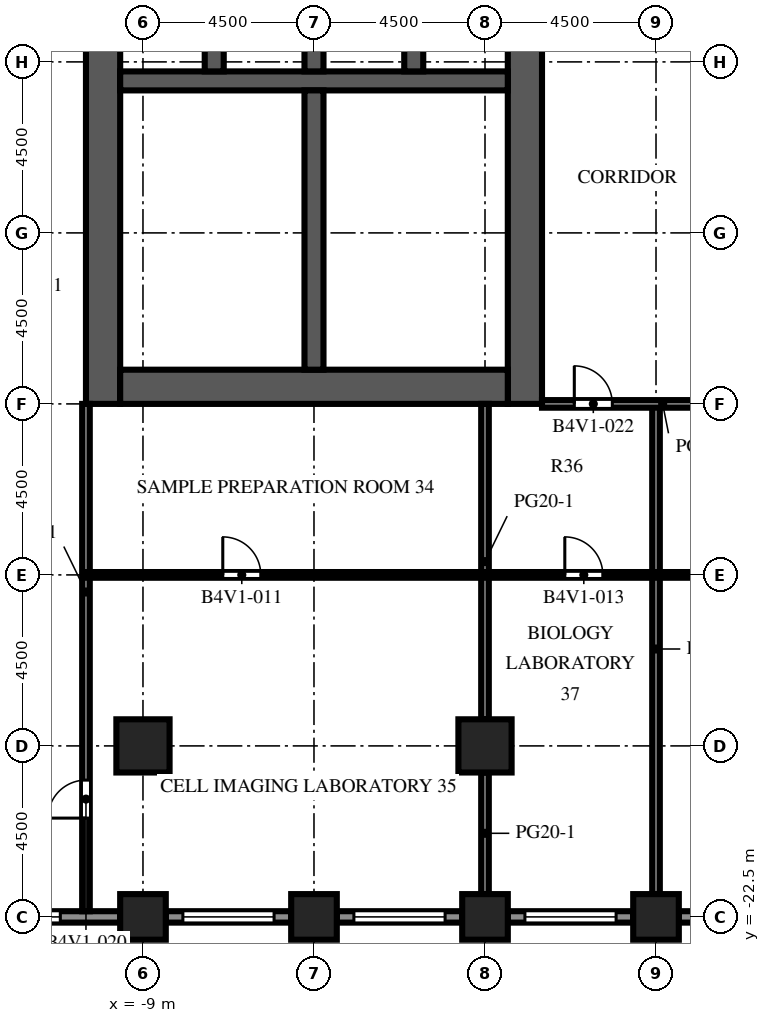
"""IFC4 building model, lengths in metres.
Left out: names, types, materials, properties, quantities, classifications, styles, units other than length and angle.
Written with IfcOpenShell. Run it as: python <this file> out.ifc"""

import sys

from ifc_helpers import new_model, si_unit, direction, frame, frame_2d, origin, origin_2d, place, context, subcontext, project, spatial, rectangle, extrude, element, fill, save


model = new_model("IFC4")
c1 = context("Model", 3, precision=1e-05, world=origin(), true_north=direction((0.0, 1.0)))
c2 = subcontext(c1, "Body", "Model", "MODEL_VIEW")
j1 = project(units=[si_unit("LENGTHUNIT", "METRE"), si_unit("PLANEANGLEUNIT", "RADIAN")], contexts=[c1])
p1 = place(None, origin())
s1 = spatial("IfcSite", under=j1, at=p1, CompositionType="ELEMENT")
p2 = place(p1, origin())
s2 = spatial("IfcBuilding", under=s1, at=p2, CompositionType="ELEMENT")
p3 = place(p2, frame((0.0, 0.0, 133.1)))
s3 = spatial("IfcBuildingStorey", under=s2, at=p3, CompositionType="ELEMENT", Elevation=133.1)
for number, where, z_axis, x_axis in (
    (1, (-9.0, -22.5, 0.0), (0.0, 0.0, 1.0), (1.0, 0.0, 0.0)),
    (2, (-4.5, -22.5, 0.0), (0.0, 0.0, 1.0), (1.0, 0.0, 0.0)),
    (3, (0.0, -22.5, 0.0), (0.0, 0.0, 1.0), (1.0, 0.0, 0.0)),
    (4, (4.5, -22.5, 0.0), (0.0, 0.0, 1.0), (1.0, 0.0, 0.0)),
):
    element("IfcColumn", number, at=place(p3, frame(where, z_axis=z_axis, x_axis=x_axis)), inside=s3, PredefinedType="COLUMN", context=c2, shape_type="SweptSolid", body=[
        extrude(rectangle(XDim=1.2, YDim=1.2, at=origin_2d()), origin(), (0.0, 0.0, 1.0), 4.1),
    ])
for number, where, z_axis, x_axis in (
    (5, (-9.0, -18.0, 0.0), (0.0, 0.0, 1.0), (1.0, 0.0, 0.0)),
    (6, (0.0, -18.0, 0.0), (0.0, 0.0, 1.0), (1.0, 0.0, 0.0)),
):
    element("IfcColumn", number, at=place(p3, frame(where, z_axis=z_axis, x_axis=x_axis)), inside=s3, PredefinedType="COLUMN", context=c2, shape_type="SweptSolid", body=[
        extrude(rectangle(XDim=1.4, YDim=1.4, at=origin_2d()), origin(), (0.0, 0.0, 1.0), 4.1),
    ])
p4 = place(p3, frame((-10.05, -9.0, 0.0), z_axis=(0.0, 0.0, 1.0), x_axis=(0.0, 1.0, 0.0)))
e7 = element("IfcWall", 7, at=p4, inside=s3, PredefinedType="SHEAR", context=c2, shape_type="SweptSolid", body=[
    extrude(rectangle(XDim=27.5, YDim=0.9, at=frame_2d((13.75, 0.0))), origin(), (0.0, 0.0, 1.0), 4.1),
])
p5 = place(p4, frame((12.55, 0.0, 0.0)))
e8 = element("IfcOpeningElement", 8, at=p5, cuts=e7, PredefinedType="OPENING", context=c2, shape_type="SweptSolid", body=[
    extrude(rectangle(XDim=2.4, YDim=2.4, at=frame_2d((1.2, 1.2))), frame((0.0, 0.46, 0.0), z_axis=(0.0, -1.0, 0.0), x_axis=(1.0, 0.0, 0.0)), (0.0, 0.0, 1.0), 0.92),
])
p6 = place(p4, frame((6.825, 0.0, 0.0)))
e9 = element("IfcOpeningElement", 9, at=p6, cuts=e7, PredefinedType="OPENING", context=c2, shape_type="SweptSolid", body=[
    extrude(rectangle(XDim=1.2, YDim=2.1, at=frame_2d((0.6, 1.05))), frame((0.0, 0.46, 0.0), z_axis=(0.0, -1.0, 0.0), x_axis=(1.0, 0.0, 0.0)), (0.0, 0.0, 1.0), 0.92),
])
p7 = place(p4, frame((19.475, 0.0, 0.0)))
e10 = element("IfcOpeningElement", 10, at=p7, cuts=e7, PredefinedType="OPENING", context=c2, shape_type="SweptSolid", body=[
    extrude(rectangle(XDim=1.2, YDim=2.1, at=frame_2d((0.6, 1.05))), frame((0.0, 0.46, 0.0), z_axis=(0.0, -1.0, 0.0), x_axis=(1.0, 0.0, 0.0)), (0.0, 0.0, 1.0), 0.92),
])
p8 = place(p3, frame((1.05, -9.0, 0.0), z_axis=(0.0, 0.0, 1.0), x_axis=(0.0, 1.0, 0.0)))
e11 = element("IfcWall", 11, at=p8, inside=s3, PredefinedType="SHEAR", context=c2, shape_type="SweptSolid", body=[
    extrude(rectangle(XDim=27.5, YDim=0.9, at=frame_2d((13.75, 0.0))), origin(), (0.0, 0.0, 1.0), 4.1),
])
p9 = place(p8, frame((12.55, 0.0, 0.0)))
e12 = element("IfcOpeningElement", 12, at=p9, cuts=e11, PredefinedType="OPENING", context=c2, shape_type="SweptSolid", body=[
    extrude(rectangle(XDim=2.4, YDim=2.4, at=frame_2d((1.2, 1.2))), frame((0.0, 0.46, 0.0), z_axis=(0.0, -1.0, 0.0), x_axis=(1.0, 0.0, 0.0)), (0.0, 0.0, 1.0), 0.92),
])
p10 = place(p8, frame((3.975, 0.0, 0.0)))
e13 = element("IfcOpeningElement", 13, at=p10, cuts=e11, PredefinedType="OPENING", context=c2, shape_type="SweptSolid", body=[
    extrude(rectangle(XDim=1.2, YDim=2.1, at=frame_2d((0.6, 1.05))), frame((0.0, 0.46, 0.0), z_axis=(0.0, -1.0, 0.0), x_axis=(1.0, 0.0, 0.0)), (0.0, 0.0, 1.0), 0.92),
])
p11 = place(p8, frame((22.325, 0.0, 0.0)))
e14 = element("IfcOpeningElement", 14, at=p11, cuts=e11, PredefinedType="OPENING", context=c2, shape_type="SweptSolid", body=[
    extrude(rectangle(XDim=1.2, YDim=2.1, at=frame_2d((0.6, 1.05))), frame((0.0, 0.46, 0.0), z_axis=(0.0, -1.0, 0.0), x_axis=(1.0, 0.0, 0.0)), (0.0, 0.0, 1.0), 0.92),
])
p12 = place(p3, frame((-9.6, -8.55, 0.0), z_axis=(0.0, 0.0, 1.0), x_axis=(1.0, 0.0, 0.0)))
e15 = element("IfcWall", 15, at=p12, inside=s3, PredefinedType="SHEAR", context=c2, shape_type="SweptSolid", body=[
    extrude(rectangle(XDim=10.2, YDim=0.9, at=frame_2d((5.1, 0.0))), origin(), (0.0, 0.0, 1.0), 4.1),
])
p13 = place(p3, frame((-9.6, -0.5, 0.0), z_axis=(0.0, 0.0, 1.0), x_axis=(1.0, 0.0, 0.0)))
e16 = element("IfcWall", 16, at=p13, inside=s3, PredefinedType="SHEAR", context=c2, shape_type="SweptSolid", body=[
    extrude(rectangle(XDim=10.2, YDim=0.5, at=frame_2d((5.1, 0.0))), origin(), (0.0, 0.0, 1.0), 4.1),
])
for number, where, z_axis, x_axis in (
    (17, (-7.125, -0.25, 0.0), (0.0, 0.0, 1.0), (0.0, 1.0, 0.0)),
    (18, (-4.5, -0.25, 0.0), (0.0, 0.0, 1.0), (0.0, 1.0, 0.0)),
    (19, (-1.875, -0.25, 0.0), (0.0, 0.0, 1.0), (0.0, 1.0, 0.0)),
):
    element("IfcWall", number, at=place(p3, frame(where, z_axis=z_axis, x_axis=x_axis)), inside=s3, PredefinedType="SHEAR", context=c2, shape_type="SweptSolid", body=[
        extrude(rectangle(XDim=2.8, YDim=0.5, at=frame_2d((1.4, 0.0))), origin(), (0.0, 0.0, 1.0), 4.1),
    ])
p14 = place(p3, frame((-4.5, -8.1, 0.0), z_axis=(0.0, 0.0, 1.0), x_axis=(0.0, 1.0, 0.0)))
e20 = element("IfcWall", 20, at=p14, inside=s3, PredefinedType="SHEAR", context=c2, shape_type="SweptSolid", body=[
    extrude(rectangle(XDim=7.35, YDim=0.5, at=frame_2d((3.675, 0.0))), origin(), (0.0, 0.0, 1.0), 4.1),
])
p15 = place(p3, frame((-9.6, -22.5, 0.0), z_axis=(0.0, 0.0, 1.0), x_axis=(-1.0, 0.0, 0.0)))
e21 = element("IfcWall", 21, at=p15, inside=s3, PredefinedType="SOLIDWALL", context=c2, shape_type="SweptSolid", body=[
    extrude(rectangle(XDim=3.3, YDim=0.3, at=frame_2d((1.65, 0.0))), origin(), (0.0, 0.0, 1.0), 2.75),
])
p16 = place(p15, frame((1.575, 0.0, 0.8)))
e22 = element("IfcOpeningElement", 22, at=p16, cuts=e21, PredefinedType="OPENING", context=c2, shape_type="SweptSolid", body=[
    extrude(rectangle(XDim=1.2, YDim=1.7, at=frame_2d((0.6, 0.85))), frame((0.0, 0.16, 0.0), z_axis=(0.0, -1.0, 0.0), x_axis=(1.0, 0.0, 0.0)), (0.0, 0.0, 1.0), 0.32),
])
p17 = place(p3, frame((-5.1, -22.5, 0.0), z_axis=(0.0, 0.0, 1.0), x_axis=(-1.0, 0.0, 0.0)))
e23 = element("IfcWall", 23, at=p17, inside=s3, PredefinedType="SOLIDWALL", context=c2, shape_type="SweptSolid", body=[
    extrude(rectangle(XDim=3.3, YDim=0.3, at=frame_2d((1.65, 0.0))), origin(), (0.0, 0.0, 1.0), 2.75),
])
p18 = place(p17, frame((0.45, 0.0, 0.8)))
e24 = element("IfcOpeningElement", 24, at=p18, cuts=e23, PredefinedType="OPENING", context=c2, shape_type="SweptSolid", body=[
    extrude(rectangle(XDim=2.4, YDim=1.7, at=frame_2d((1.2, 0.85))), frame((0.0, 0.16, 0.0), z_axis=(0.0, -1.0, 0.0), x_axis=(1.0, 0.0, 0.0)), (0.0, 0.0, 1.0), 0.32),
])
p19 = place(p3, frame((-0.6, -22.5, 0.0), z_axis=(0.0, 0.0, 1.0), x_axis=(-1.0, 0.0, 0.0)))
e25 = element("IfcWall", 25, at=p19, inside=s3, PredefinedType="SOLIDWALL", context=c2, shape_type="SweptSolid", body=[
    extrude(rectangle(XDim=3.3, YDim=0.3, at=frame_2d((1.65, 0.0))), origin(), (0.0, 0.0, 1.0), 2.75),
])
p20 = place(p19, frame((0.45, 0.0, 0.8)))
e26 = element("IfcOpeningElement", 26, at=p20, cuts=e25, PredefinedType="OPENING", context=c2, shape_type="SweptSolid", body=[
    extrude(rectangle(XDim=2.4, YDim=1.7, at=frame_2d((1.2, 0.85))), frame((0.0, 0.16, 0.0), z_axis=(0.0, -1.0, 0.0), x_axis=(1.0, 0.0, 0.0)), (0.0, 0.0, 1.0), 0.32),
])
p21 = place(p3, frame((3.9, -22.5, 0.0), z_axis=(0.0, 0.0, 1.0), x_axis=(-1.0, 0.0, 0.0)))
e27 = element("IfcWall", 27, at=p21, inside=s3, PredefinedType="SOLIDWALL", context=c2, shape_type="SweptSolid", body=[
    extrude(rectangle(XDim=3.3, YDim=0.3, at=frame_2d((1.65, 0.0))), origin(), (0.0, 0.0, 1.0), 2.75),
])
p22 = place(p21, frame((0.45, 0.0, 0.8)))
e28 = element("IfcOpeningElement", 28, at=p22, cuts=e27, PredefinedType="OPENING", context=c2, shape_type="SweptSolid", body=[
    extrude(rectangle(XDim=2.4, YDim=1.7, at=frame_2d((1.2, 0.85))), frame((0.0, 0.16, 0.0), z_axis=(0.0, -1.0, 0.0), x_axis=(1.0, 0.0, 0.0)), (0.0, 0.0, 1.0), 0.32),
])
p23 = place(p3, frame((8.4, -22.5, 0.0), z_axis=(0.0, 0.0, 1.0), x_axis=(-1.0, 0.0, 0.0)))
e29 = element("IfcWall", 29, at=p23, inside=s3, PredefinedType="SOLIDWALL", context=c2, shape_type="SweptSolid", body=[
    extrude(rectangle(XDim=3.3, YDim=0.3, at=frame_2d((1.65, 0.0))), origin(), (0.0, 0.0, 1.0), 2.75),
])
p24 = place(p23, frame((0.45, 0.0, 0.8)))
e30 = element("IfcOpeningElement", 30, at=p24, cuts=e29, PredefinedType="OPENING", context=c2, shape_type="SweptSolid", body=[
    extrude(rectangle(XDim=2.4, YDim=1.7, at=frame_2d((1.2, 0.85))), frame((0.0, 0.16, 0.0), z_axis=(0.0, -1.0, 0.0), x_axis=(1.0, 0.0, 0.0)), (0.0, 0.0, 1.0), 0.32),
])
p25 = place(p3, frame((-0.9, -8.1, 0.0), z_axis=(0.0, 0.0, 1.0), x_axis=(0.0, 1.0, 0.0)))
e31 = element("IfcWall", 31, at=p25, inside=s3, PredefinedType="PARTITIONING", context=c2, shape_type="SweptSolid", body=[
    extrude(rectangle(XDim=2.205, YDim=0.1, at=frame_2d((1.103, 0.0))), origin(), (0.0, 0.0, 1.0), 3.65),
])
p26 = place(p25, frame((0.603, 0.0, 0.0)))
e32 = element("IfcOpeningElement", 32, at=p26, cuts=e31, PredefinedType="OPENING", context=c2, shape_type="SweptSolid", body=[
    extrude(rectangle(XDim=1.0, YDim=2.1, at=frame_2d((0.5, 1.05))), frame((0.0, 0.06, 0.0), z_axis=(0.0, -1.0, 0.0), x_axis=(1.0, 0.0, 0.0)), (0.0, 0.0, 1.0), 0.12),
])
p27 = place(p3, frame((-0.9, -5.895, 0.0), z_axis=(0.0, 0.0, 1.0), x_axis=(0.0, 1.0, 0.0)))
e33 = element("IfcWall", 33, at=p27, inside=s3, PredefinedType="PARTITIONING", context=c2, shape_type="SweptSolid", body=[
    extrude(rectangle(XDim=2.205, YDim=0.1, at=frame_2d((1.103, 0.0))), origin(), (0.0, 0.0, 1.0), 3.65),
])
p28 = place(p27, frame((0.603, 0.0, 0.0)))
e34 = element("IfcOpeningElement", 34, at=p28, cuts=e33, PredefinedType="OPENING", context=c2, shape_type="SweptSolid", body=[
    extrude(rectangle(XDim=1.0, YDim=2.1, at=frame_2d((0.5, 1.05))), frame((0.0, 0.06, 0.0), z_axis=(0.0, -1.0, 0.0), x_axis=(1.0, 0.0, 0.0)), (0.0, 0.0, 1.0), 0.12),
])
p29 = place(p3, frame((-0.9, -3.69, 0.0), z_axis=(0.0, 0.0, 1.0), x_axis=(0.0, 1.0, 0.0)))
e35 = element("IfcWall", 35, at=p29, inside=s3, PredefinedType="PARTITIONING", context=c2, shape_type="SweptSolid", body=[
    extrude(rectangle(XDim=1.617, YDim=0.1, at=frame_2d((0.809, 0.0))), origin(), (0.0, 0.0, 1.0), 3.65),
])
p30 = place(p29, frame((0.309, 0.0, 0.0)))
e36 = element("IfcOpeningElement", 36, at=p30, cuts=e35, PredefinedType="OPENING", context=c2, shape_type="SweptSolid", body=[
    extrude(rectangle(XDim=1.0, YDim=2.1, at=frame_2d((0.5, 1.05))), frame((0.0, 0.06, 0.0), z_axis=(0.0, -1.0, 0.0), x_axis=(1.0, 0.0, 0.0)), (0.0, 0.0, 1.0), 0.12),
])
p31 = place(p3, frame((-0.9, -2.073, 0.0), z_axis=(0.0, 0.0, 1.0), x_axis=(0.0, 1.0, 0.0)))
e37 = element("IfcWall", 37, at=p31, inside=s3, PredefinedType="PARTITIONING", context=c2, shape_type="SweptSolid", body=[
    extrude(rectangle(XDim=1.323, YDim=0.1, at=frame_2d((0.662, 0.0))), origin(), (0.0, 0.0, 1.0), 3.65),
])
p32 = place(p31, frame((0.2, 0.0, 0.0)))
e38 = element("IfcOpeningElement", 38, at=p32, cuts=e37, PredefinedType="OPENING", context=c2, shape_type="SweptSolid", body=[
    extrude(rectangle(XDim=0.923, YDim=2.1, at=frame_2d((0.461, 1.05))), frame((0.0, 0.06, 0.0), z_axis=(0.0, -1.0, 0.0), x_axis=(1.0, 0.0, 0.0)), (0.0, 0.0, 1.0), 0.12),
])
for number, where, z_axis, x_axis in (
    (39, (-4.25, -5.895, 0.0), (0.0, 0.0, 1.0), (1.0, 0.0, 0.0)),
    (40, (-4.25, -3.69, 0.0), (0.0, 0.0, 1.0), (1.0, 0.0, 0.0)),
    (41, (-4.25, -2.073, 0.0), (0.0, 0.0, 1.0), (1.0, 0.0, 0.0)),
):
    element("IfcWall", number, at=place(p3, frame(where, z_axis=z_axis, x_axis=x_axis)), inside=s3, PredefinedType="PARTITIONING", context=c2, shape_type="SweptSolid", body=[
        extrude(rectangle(XDim=3.35, YDim=0.1, at=frame_2d((1.675, 0.0))), origin(), (0.0, 0.0, 1.0), 3.65),
    ])
p33 = place(p3, frame((-10.5, -9.0, 0.0), z_axis=(0.0, 0.0, 1.0), x_axis=(0.0, -1.0, 0.0)))
e42 = element("IfcWall", 42, at=p33, inside=s3, PredefinedType="PARTITIONING", context=c2, shape_type="SweptSolid", body=[
    extrude(rectangle(XDim=13.35, YDim=0.2, at=frame_2d((6.675, 0.0))), origin(), (0.0, 0.0, 1.0), 3.65),
])
p34 = place(p33, frame((9.9, 0.0, 0.0)))
e43 = element("IfcOpeningElement", 43, at=p34, cuts=e42, PredefinedType="OPENING", context=c2, shape_type="SweptSolid", body=[
    extrude(rectangle(XDim=1.0, YDim=2.1, at=frame_2d((0.5, 1.05))), frame((0.0, 0.11, 0.0), z_axis=(0.0, -1.0, 0.0), x_axis=(1.0, 0.0, 0.0)), (0.0, 0.0, 1.0), 0.22),
])
p35 = place(p3, frame((0.0, -21.9, 0.0), z_axis=(0.0, 0.0, 1.0), x_axis=(0.0, 1.0, 0.0)))
e44 = element("IfcWall", 44, at=p35, inside=s3, PredefinedType="PARTITIONING", context=c2, shape_type="SweptSolid", body=[
    extrude(rectangle(XDim=3.2, YDim=0.2, at=frame_2d((1.6, 0.0))), origin(), (0.0, 0.0, 1.0), 3.65),
])
p36 = place(p3, frame((0.0, -17.3, 0.0), z_axis=(0.0, 0.0, 1.0), x_axis=(0.0, 1.0, 0.0)))
e45 = element("IfcWall", 45, at=p36, inside=s3, PredefinedType="PARTITIONING", context=c2, shape_type="SweptSolid", body=[
    extrude(rectangle(XDim=8.3, YDim=0.2, at=frame_2d((4.15, 0.0))), origin(), (0.0, 0.0, 1.0), 3.65),
])
p37 = place(p3, frame((4.5, -21.9, 0.0), z_axis=(0.0, 0.0, 1.0), x_axis=(0.0, 1.0, 0.0)))
e46 = element("IfcWall", 46, at=p37, inside=s3, PredefinedType="PARTITIONING", context=c2, shape_type="SweptSolid", body=[
    extrude(rectangle(XDim=12.9, YDim=0.2, at=frame_2d((6.45, 0.0))), origin(), (0.0, 0.0, 1.0), 3.65),
])
p38 = place(p3, frame((-10.5, -13.5, 0.0), z_axis=(0.0, 0.0, 1.0), x_axis=(1.0, 0.0, 0.0)))
e47 = element("IfcWall", 47, at=p38, inside=s3, PredefinedType="PARTITIONING", context=c2, shape_type="SweptSolid", body=[
    extrude(rectangle(XDim=28.5, YDim=0.15, at=frame_2d((14.25, 0.0))), origin(), (0.0, 0.0, 1.0), 3.65),
])
p39 = place(p38, frame((3.6, 0.0, 0.0)))
e48 = element("IfcOpeningElement", 48, at=p39, cuts=e47, PredefinedType="OPENING", context=c2, shape_type="SweptSolid", body=[
    extrude(rectangle(XDim=1.0, YDim=2.1, at=frame_2d((0.5, 1.05))), frame((0.0, 0.085, 0.0), z_axis=(0.0, -1.0, 0.0), x_axis=(1.0, 0.0, 0.0)), (0.0, 0.0, 1.0), 0.17),
])
p40 = place(p38, frame((12.6, 0.0, 0.0)))
e49 = element("IfcOpeningElement", 49, at=p40, cuts=e47, PredefinedType="OPENING", context=c2, shape_type="SweptSolid", body=[
    extrude(rectangle(XDim=1.0, YDim=2.1, at=frame_2d((0.5, 1.05))), frame((0.0, 0.085, 0.0), z_axis=(0.0, -1.0, 0.0), x_axis=(1.0, 0.0, 0.0)), (0.0, 0.0, 1.0), 0.17),
])
p41 = place(p38, frame((19.35, 0.0, 0.0)))
e50 = element("IfcOpeningElement", 50, at=p41, cuts=e47, PredefinedType="OPENING", context=c2, shape_type="SweptSolid", body=[
    extrude(rectangle(XDim=1.0, YDim=2.1, at=frame_2d((0.5, 1.05))), frame((0.0, 0.085, 0.0), z_axis=(0.0, -1.0, 0.0), x_axis=(1.0, 0.0, 0.0)), (0.0, 0.0, 1.0), 0.17),
])
p42 = place(p3, frame((6.0, -9.0, 0.0), z_axis=(0.0, 0.0, 1.0), x_axis=(-1.0, 0.0, 0.0)))
e51 = element("IfcWall", 51, at=p42, inside=s3, PredefinedType="PARTITIONING", context=c2, shape_type="SweptSolid", body=[
    extrude(rectangle(XDim=4.5, YDim=0.2, at=frame_2d((2.25, 0.0))), origin(), (0.0, 0.0, 1.0), 3.65),
])
p43 = place(p42, frame((2.65, 0.0, 0.0)))
e52 = element("IfcOpeningElement", 52, at=p43, cuts=e51, PredefinedType="OPENING", context=c2, shape_type="SweptSolid", body=[
    extrude(rectangle(XDim=1.0, YDim=2.1, at=frame_2d((0.5, 1.05))), frame((0.0, 0.11, 0.0), z_axis=(0.0, -1.0, 0.0), x_axis=(1.0, 0.0, 0.0)), (0.0, 0.0, 1.0), 0.22),
])
p44 = place(p16, origin())
e53 = element("IfcWindow", 53, at=p44, inside=s3, PartitioningType="SINGLE_PANEL", PredefinedType="WINDOW", context=c2, shape_type="SweptSolid", body=[
    extrude(rectangle(XDim=1.2, YDim=1.7, at=frame_2d((0.6, 0.85))), frame((0.0, 0.03, 0.0), z_axis=(0.0, -1.0, 0.0), x_axis=(1.0, 0.0, 0.0)), (0.0, 0.0, 1.0), 0.06),
])
fill(e22, e53)
p45 = place(p18, origin())
e54 = element("IfcWindow", 54, at=p45, inside=s3, PartitioningType="SINGLE_PANEL", PredefinedType="WINDOW", context=c2, shape_type="SweptSolid", body=[
    extrude(rectangle(XDim=2.4, YDim=1.7, at=frame_2d((1.2, 0.85))), frame((0.0, 0.03, 0.0), z_axis=(0.0, -1.0, 0.0), x_axis=(1.0, 0.0, 0.0)), (0.0, 0.0, 1.0), 0.06),
])
fill(e24, e54)
p46 = place(p20, origin())
e55 = element("IfcWindow", 55, at=p46, inside=s3, PartitioningType="SINGLE_PANEL", PredefinedType="WINDOW", context=c2, shape_type="SweptSolid", body=[
    extrude(rectangle(XDim=2.4, YDim=1.7, at=frame_2d((1.2, 0.85))), frame((0.0, 0.03, 0.0), z_axis=(0.0, -1.0, 0.0), x_axis=(1.0, 0.0, 0.0)), (0.0, 0.0, 1.0), 0.06),
])
fill(e26, e55)
p47 = place(p22, origin())
e56 = element("IfcWindow", 56, at=p47, inside=s3, PartitioningType="SINGLE_PANEL", PredefinedType="WINDOW", context=c2, shape_type="SweptSolid", body=[
    extrude(rectangle(XDim=2.4, YDim=1.7, at=frame_2d((1.2, 0.85))), frame((0.0, 0.03, 0.0), z_axis=(0.0, -1.0, 0.0), x_axis=(1.0, 0.0, 0.0)), (0.0, 0.0, 1.0), 0.06),
])
fill(e28, e56)
p48 = place(p6, origin())
e57 = element("IfcDoor", 57, at=p48, inside=s3, OperationType="SINGLE_SWING_LEFT", PredefinedType="DOOR", context=c2, shape_type="SweptSolid", body=[
    extrude(rectangle(XDim=1.2, YDim=2.1, at=frame_2d((0.6, 1.05))), frame((0.0, 0.025, 0.0), z_axis=(0.0, -1.0, 0.0), x_axis=(1.0, 0.0, 0.0)), (0.0, 0.0, 1.0), 0.05),
])
fill(e9, e57)
p49 = place(p10, origin())
e58 = element("IfcDoor", 58, at=p49, inside=s3, OperationType="SINGLE_SWING_LEFT", PredefinedType="DOOR", context=c2, shape_type="SweptSolid", body=[
    extrude(rectangle(XDim=1.2, YDim=2.1, at=frame_2d((0.6, 1.05))), frame((0.0, 0.425, 0.0), z_axis=(0.0, -1.0, 0.0), x_axis=(1.0, 0.0, 0.0)), (0.0, 0.0, 1.0), 0.05),
])
fill(e13, e58)
p50 = place(p26, origin())
e59 = element("IfcDoor", 59, at=p50, inside=s3, OperationType="SINGLE_SWING_RIGHT", PredefinedType="DOOR", context=c2, shape_type="SweptSolid", body=[
    extrude(rectangle(XDim=1.0, YDim=2.1, at=frame_2d((0.5, 1.05))), frame((0.0, 0.025, 0.0), z_axis=(0.0, -1.0, 0.0), x_axis=(1.0, 0.0, 0.0)), (0.0, 0.0, 1.0), 0.05),
])
fill(e32, e59)
p51 = place(p28, origin())
e60 = element("IfcDoor", 60, at=p51, inside=s3, OperationType="SINGLE_SWING_LEFT", PredefinedType="DOOR", context=c2, shape_type="SweptSolid", body=[
    extrude(rectangle(XDim=1.0, YDim=2.1, at=frame_2d((0.5, 1.05))), frame((0.0, 0.025, 0.0), z_axis=(0.0, -1.0, 0.0), x_axis=(1.0, 0.0, 0.0)), (0.0, 0.0, 1.0), 0.05),
])
fill(e34, e60)
p52 = place(p30, origin())
e61 = element("IfcDoor", 61, at=p52, inside=s3, OperationType="SINGLE_SWING_RIGHT", PredefinedType="DOOR", context=c2, shape_type="SweptSolid", body=[
    extrude(rectangle(XDim=1.0, YDim=2.1, at=frame_2d((0.5, 1.05))), frame((0.0, 0.025, 0.0), z_axis=(0.0, -1.0, 0.0), x_axis=(1.0, 0.0, 0.0)), (0.0, 0.0, 1.0), 0.05),
])
fill(e36, e61)
p53 = place(p32, origin())
e62 = element("IfcDoor", 62, at=p53, inside=s3, OperationType="SINGLE_SWING_LEFT", PredefinedType="DOOR", context=c2, shape_type="SweptSolid", body=[
    extrude(rectangle(XDim=0.923, YDim=2.1, at=frame_2d((0.461, 1.05))), frame((0.0, 0.025, 0.0), z_axis=(0.0, -1.0, 0.0), x_axis=(1.0, 0.0, 0.0)), (0.0, 0.0, 1.0), 0.05),
])
fill(e38, e62)
p54 = place(p39, origin())
e63 = element("IfcDoor", 63, at=p54, inside=s3, OperationType="SINGLE_SWING_LEFT", PredefinedType="DOOR", context=c2, shape_type="SweptSolid", body=[
    extrude(rectangle(XDim=1.0, YDim=2.1, at=frame_2d((0.5, 1.05))), frame((0.0, 0.025, 0.0), z_axis=(0.0, -1.0, 0.0), x_axis=(1.0, 0.0, 0.0)), (0.0, 0.0, 1.0), 0.05),
])
fill(e48, e63)
p55 = place(p40, origin())
e64 = element("IfcDoor", 64, at=p55, inside=s3, OperationType="SINGLE_SWING_LEFT", PredefinedType="DOOR", context=c2, shape_type="SweptSolid", body=[
    extrude(rectangle(XDim=1.0, YDim=2.1, at=frame_2d((0.5, 1.05))), frame((0.0, 0.025, 0.0), z_axis=(0.0, -1.0, 0.0), x_axis=(1.0, 0.0, 0.0)), (0.0, 0.0, 1.0), 0.05),
])
fill(e49, e64)
p56 = place(p34, origin())
e65 = element("IfcDoor", 65, at=p56, inside=s3, OperationType="SINGLE_SWING_RIGHT", PredefinedType="DOOR", context=c2, shape_type="SweptSolid", body=[
    extrude(rectangle(XDim=1.0, YDim=2.1, at=frame_2d((0.5, 1.05))), frame((0.0, 0.025, 0.0), z_axis=(0.0, -1.0, 0.0), x_axis=(1.0, 0.0, 0.0)), (0.0, 0.0, 1.0), 0.05),
])
fill(e43, e65)
p57 = place(p43, origin())
e66 = element("IfcDoor", 66, at=p57, inside=s3, OperationType="SINGLE_SWING_RIGHT", PredefinedType="DOOR", context=c2, shape_type="SweptSolid", body=[
    extrude(rectangle(XDim=1.0, YDim=2.1, at=frame_2d((0.5, 1.05))), frame((0.0, 0.025, 0.0), z_axis=(0.0, -1.0, 0.0), x_axis=(1.0, 0.0, 0.0)), (0.0, 0.0, 1.0), 0.05),
])
fill(e52, e66)
save(model, sys.argv[1])
